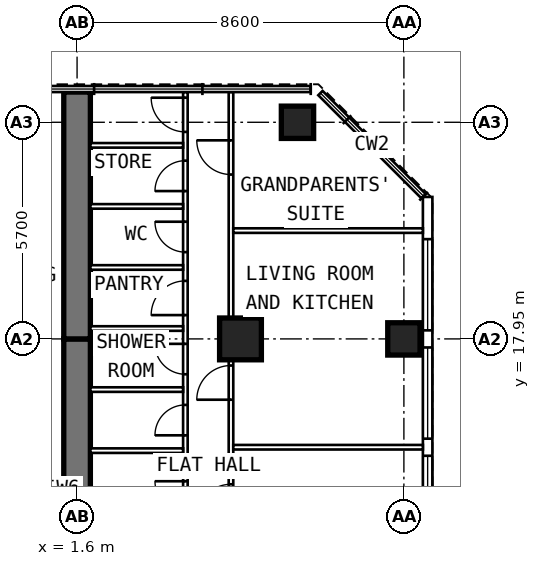
"""IFC4 building model, lengths in metres.
Left out: names, types, materials, properties, quantities, classifications, styles, units other than length and angle.
Written with IfcOpenShell. Run it as: python <this file> out.ifc"""

import sys

from ifc_helpers import new_model, si_unit, direction, frame, frame_2d, origin, origin_2d, place, context, subcontext, project, spatial, rectangle, extrude, element, fill, save


model = new_model("IFC4")
c1 = context("Model", 3, precision=1e-05, world=origin(), true_north=direction((0.0, 1.0)))
c2 = subcontext(c1, "Body", "Model", "MODEL_VIEW")
j1 = project(units=[si_unit("LENGTHUNIT", "METRE"), si_unit("PLANEANGLEUNIT", "RADIAN")], contexts=[c1])
p1 = place(None, origin())
s1 = spatial("IfcSite", under=j1, at=p1, CompositionType="ELEMENT")
p2 = place(p1, origin())
s2 = spatial("IfcBuilding", under=s1, at=p2, CompositionType="ELEMENT")
p3 = place(p2, frame((0.0, 0.0, 235.2)))
s3 = spatial("IfcBuildingStorey", under=s2, at=p3, CompositionType="ELEMENT", Elevation=235.2)
for number, where, z_axis, x_axis in (
    (1, (10.2, 17.95, 0.0), (0.0, 0.0, 1.0), (0.0, 1.0, 0.0)),
    (2, (7.4, 23.65, 0.0), (0.0, 0.0, 1.0), (0.0, 1.0, 0.0)),
):
    element("IfcColumn", number, at=place(p3, frame(where, z_axis=z_axis, x_axis=x_axis)), inside=s3, PredefinedType="COLUMN", context=c2, shape_type="SweptSolid", body=[
        extrude(rectangle(XDim=0.85, YDim=0.85, at=origin_2d()), origin(), (0.0, 0.0, 1.0), 3.6),
    ])
p4 = place(p3, frame((5.9, 17.95, 0.0), z_axis=(0.0, 0.0, 1.0), x_axis=(0.0, 1.0, 0.0)))
e3 = element("IfcColumn", 3, at=p4, inside=s3, PredefinedType="COLUMN", context=c2, shape_type="SweptSolid", body=[
    extrude(rectangle(XDim=1.1, YDim=1.1, at=origin_2d()), origin(), (0.0, 0.0, 1.0), 3.6),
])
p5 = place(p3, frame((1.6, 9.6, 0.0), z_axis=(0.0, 0.0, 1.0), x_axis=(0.0, 1.0, 0.0)))
e4 = element("IfcWall", 4, at=p5, inside=s3, PredefinedType="SHEAR", context=c2, shape_type="SweptSolid", body=[
    extrude(rectangle(XDim=8.35, YDim=0.7, at=frame_2d((4.175, 0.0))), origin(), (0.0, 0.0, 1.0), 3.6),
])
p6 = place(p5, frame((1.3, 0.0, 0.0)))
e5 = element("IfcOpeningElement", 5, at=p6, cuts=e4, PredefinedType="OPENING", context=c2, shape_type="SweptSolid", body=[
    extrude(rectangle(XDim=1.0, YDim=2.1, at=frame_2d((0.5, 1.05))), frame((0.0, 0.362, 0.0), z_axis=(0.0, -1.0, 0.0), x_axis=(1.0, 0.0, 0.0)), (0.0, 0.0, 1.0), 0.724),
])
p7 = place(p3, frame((1.6, 17.95, 0.0), z_axis=(0.0, 0.0, 1.0), x_axis=(0.0, 1.0, 0.0)))
e6 = element("IfcWall", 6, at=p7, inside=s3, PredefinedType="SHEAR", context=c2, shape_type="SweptSolid", body=[
    extrude(rectangle(XDim=6.495, YDim=0.7, at=frame_2d((3.248, 0.0))), origin(), (0.0, 0.0, 1.0), 3.6),
])
p8 = place(p3, frame((10.825, 6.409, 0.0), z_axis=(0.0, 0.0, 1.0), x_axis=(0.0, 1.0, 0.0)))
e7 = element("IfcWall", 7, at=p8, inside=s3, PredefinedType="SOLIDWALL", context=c2, shape_type="SweptSolid", body=[
    extrude(rectangle(XDim=15.276, YDim=0.25, at=frame_2d((7.638, 0.0))), origin(), (0.0, 0.0, 1.0), 3.35),
])
p9 = place(p8, frame((0.366, 0.0, 0.8)))
e8 = element("IfcOpeningElement", 8, at=p9, cuts=e7, PredefinedType="OPENING", context=c2, shape_type="SweptSolid", body=[
    extrude(rectangle(XDim=2.4, YDim=1.8, at=frame_2d((1.2, 0.9))), frame((0.0, 0.137, 0.0), z_axis=(0.0, -1.0, 0.0), x_axis=(1.0, 0.0, 0.0)), (0.0, 0.0, 1.0), 0.274),
])
p10 = place(p8, frame((3.216, 0.0, 0.8)))
e9 = element("IfcOpeningElement", 9, at=p10, cuts=e7, PredefinedType="OPENING", context=c2, shape_type="SweptSolid", body=[
    extrude(rectangle(XDim=2.4, YDim=1.8, at=frame_2d((1.2, 0.9))), frame((0.0, 0.137, 0.0), z_axis=(0.0, -1.0, 0.0), x_axis=(1.0, 0.0, 0.0)), (0.0, 0.0, 1.0), 0.274),
])
p11 = place(p8, frame((6.066, 0.0, 0.8)))
e10 = element("IfcOpeningElement", 10, at=p11, cuts=e7, PredefinedType="OPENING", context=c2, shape_type="SweptSolid", body=[
    extrude(rectangle(XDim=2.4, YDim=1.8, at=frame_2d((1.2, 0.9))), frame((0.0, 0.137, 0.0), z_axis=(0.0, -1.0, 0.0), x_axis=(1.0, 0.0, 0.0)), (0.0, 0.0, 1.0), 0.274),
])
p12 = place(p8, frame((8.916, 0.0, 0.8)))
e11 = element("IfcOpeningElement", 11, at=p12, cuts=e7, PredefinedType="OPENING", context=c2, shape_type="SweptSolid", body=[
    extrude(rectangle(XDim=2.4, YDim=1.8, at=frame_2d((1.2, 0.9))), frame((0.0, 0.137, 0.0), z_axis=(0.0, -1.0, 0.0), x_axis=(1.0, 0.0, 0.0)), (0.0, 0.0, 1.0), 0.274),
])
p13 = place(p8, frame((11.766, 0.0, 0.8)))
e12 = element("IfcOpeningElement", 12, at=p13, cuts=e7, PredefinedType="OPENING", context=c2, shape_type="SweptSolid", body=[
    extrude(rectangle(XDim=2.4, YDim=1.8, at=frame_2d((1.2, 0.9))), frame((0.0, 0.137, 0.0), z_axis=(0.0, -1.0, 0.0), x_axis=(1.0, 0.0, 0.0)), (0.0, 0.0, 1.0), 0.274),
])
p14 = place(p3, frame((4.45, 9.9, 0.0), z_axis=(0.0, 0.0, 1.0), x_axis=(0.0, 1.0, 0.0)))
e13 = element("IfcWall", 13, at=p14, inside=s3, PredefinedType="PARTITIONING", context=c2, shape_type="SweptSolid", body=[
    extrude(rectangle(XDim=14.545, YDim=0.12, at=frame_2d((7.272, 0.0))), origin(), (0.0, 0.0, 1.0), 3.35),
])
p15 = place(p14, frame((0.95, 0.0, 0.0)))
e14 = element("IfcOpeningElement", 14, at=p15, cuts=e13, PredefinedType="OPENING", context=c2, shape_type="SweptSolid", body=[
    extrude(rectangle(XDim=0.9, YDim=2.1, at=frame_2d((0.45, 1.05))), frame((0.0, 0.072, 0.0), z_axis=(0.0, -1.0, 0.0), x_axis=(1.0, 0.0, 0.0)), (0.0, 0.0, 1.0), 0.144),
])
p16 = place(p14, frame((3.505, 0.0, 0.0)))
e15 = element("IfcOpeningElement", 15, at=p16, cuts=e13, PredefinedType="OPENING", context=c2, shape_type="SweptSolid", body=[
    extrude(rectangle(XDim=0.8, YDim=2.1, at=frame_2d((0.4, 1.05))), frame((0.0, 0.072, 0.0), z_axis=(0.0, -1.0, 0.0), x_axis=(1.0, 0.0, 0.0)), (0.0, 0.0, 1.0), 0.144),
])
p17 = place(p14, frame((5.513, 0.0, 0.0)))
e16 = element("IfcOpeningElement", 16, at=p17, cuts=e13, PredefinedType="OPENING", context=c2, shape_type="SweptSolid", body=[
    extrude(rectangle(XDim=0.8, YDim=2.1, at=frame_2d((0.4, 1.05))), frame((0.0, 0.072, 0.0), z_axis=(0.0, -1.0, 0.0), x_axis=(1.0, 0.0, 0.0)), (0.0, 0.0, 1.0), 0.144),
])
p18 = place(p14, frame((7.12, 0.0, 0.0)))
e17 = element("IfcOpeningElement", 17, at=p18, cuts=e13, PredefinedType="OPENING", context=c2, shape_type="SweptSolid", body=[
    extrude(rectangle(XDim=0.8, YDim=2.1, at=frame_2d((0.4, 1.05))), frame((0.0, 0.072, 0.0), z_axis=(0.0, -1.0, 0.0), x_axis=(1.0, 0.0, 0.0)), (0.0, 0.0, 1.0), 0.144),
])
p19 = place(p14, frame((8.677, 0.0, 0.0)))
e18 = element("IfcOpeningElement", 18, at=p19, cuts=e13, PredefinedType="OPENING", context=c2, shape_type="SweptSolid", body=[
    extrude(rectangle(XDim=0.9, YDim=2.1, at=frame_2d((0.45, 1.05))), frame((0.0, 0.072, 0.0), z_axis=(0.0, -1.0, 0.0), x_axis=(1.0, 0.0, 0.0)), (0.0, 0.0, 1.0), 0.144),
])
p20 = place(p14, frame((10.333, 0.0, 0.0)))
e19 = element("IfcOpeningElement", 19, at=p20, cuts=e13, PredefinedType="OPENING", context=c2, shape_type="SweptSolid", body=[
    extrude(rectangle(XDim=0.8, YDim=2.1, at=frame_2d((0.4, 1.05))), frame((0.0, 0.072, 0.0), z_axis=(0.0, -1.0, 0.0), x_axis=(1.0, 0.0, 0.0)), (0.0, 0.0, 1.0), 0.144),
])
p21 = place(p14, frame((11.94, 0.0, 0.0)))
e20 = element("IfcOpeningElement", 20, at=p21, cuts=e13, PredefinedType="OPENING", context=c2, shape_type="SweptSolid", body=[
    extrude(rectangle(XDim=0.8, YDim=2.1, at=frame_2d((0.4, 1.05))), frame((0.0, 0.072, 0.0), z_axis=(0.0, -1.0, 0.0), x_axis=(1.0, 0.0, 0.0)), (0.0, 0.0, 1.0), 0.144),
])
p22 = place(p14, frame((13.497, 0.0, 0.0)))
e21 = element("IfcOpeningElement", 21, at=p22, cuts=e13, PredefinedType="OPENING", context=c2, shape_type="SweptSolid", body=[
    extrude(rectangle(XDim=0.9, YDim=2.1, at=frame_2d((0.45, 1.05))), frame((0.0, 0.072, 0.0), z_axis=(0.0, -1.0, 0.0), x_axis=(1.0, 0.0, 0.0)), (0.0, 0.0, 1.0), 0.144),
])
p23 = place(p3, frame((5.65, 9.6, 0.0), z_axis=(0.0, 0.0, 1.0), x_axis=(0.0, 1.0, 0.0)))
e22 = element("IfcWall", 22, at=p23, inside=s3, PredefinedType="PARTITIONING", context=c2, shape_type="SweptSolid", body=[
    extrude(rectangle(XDim=14.845, YDim=0.12, at=frame_2d((7.422, 0.0))), origin(), (0.0, 0.0, 1.0), 3.35),
])
p24 = place(p23, frame((1.05, 0.0, 0.0)))
e23 = element("IfcOpeningElement", 23, at=p24, cuts=e22, PredefinedType="OPENING", context=c2, shape_type="SweptSolid", body=[
    extrude(rectangle(XDim=0.9, YDim=2.1, at=frame_2d((0.45, 1.05))), frame((0.0, 0.072, 0.0), z_axis=(0.0, -1.0, 0.0), x_axis=(1.0, 0.0, 0.0)), (0.0, 0.0, 1.0), 0.144),
])
p25 = place(p23, frame((3.625, 0.0, 0.0)))
e24 = element("IfcOpeningElement", 24, at=p25, cuts=e22, PredefinedType="OPENING", context=c2, shape_type="SweptSolid", body=[
    extrude(rectangle(XDim=0.9, YDim=2.1, at=frame_2d((0.45, 1.05))), frame((0.0, 0.072, 0.0), z_axis=(0.0, -1.0, 0.0), x_axis=(1.0, 0.0, 0.0)), (0.0, 0.0, 1.0), 0.144),
])
p26 = place(p23, frame((6.75, 0.0, 0.0)))
e25 = element("IfcOpeningElement", 25, at=p26, cuts=e22, PredefinedType="OPENING", context=c2, shape_type="SweptSolid", body=[
    extrude(rectangle(XDim=0.9, YDim=2.1, at=frame_2d((0.45, 1.05))), frame((0.0, 0.072, 0.0), z_axis=(0.0, -1.0, 0.0), x_axis=(1.0, 0.0, 0.0)), (0.0, 0.0, 1.0), 0.144),
])
p27 = place(p23, frame((12.675, 0.0, 0.0)))
e26 = element("IfcOpeningElement", 26, at=p27, cuts=e22, PredefinedType="OPENING", context=c2, shape_type="SweptSolid", body=[
    extrude(rectangle(XDim=0.9, YDim=2.1, at=frame_2d((0.45, 1.05))), frame((0.0, 0.072, 0.0), z_axis=(0.0, -1.0, 0.0), x_axis=(1.0, 0.0, 0.0)), (0.0, 0.0, 1.0), 0.144),
])
for number, where, z_axis, x_axis in (
    (27, (5.71, 15.1, 0.0), (0.0, 0.0, 1.0), (1.0, 0.0, 0.0)),
    (28, (5.71, 20.8, 0.0), (0.0, 0.0, 1.0), (1.0, 0.0, 0.0)),
):
    element("IfcWall", number, at=place(p3, frame(where, z_axis=z_axis, x_axis=x_axis)), inside=s3, PredefinedType="PARTITIONING", context=c2, shape_type="SweptSolid", body=[
        extrude(rectangle(XDim=4.99, YDim=0.12, at=frame_2d((2.495, 0.0))), origin(), (0.0, 0.0, 1.0), 3.35),
    ])
for number, where, z_axis, x_axis in (
    (29, (1.95, 15.01, 0.0), (0.0, 0.0, 1.0), (1.0, 0.0, 0.0)),
    (30, (1.95, 16.617, 0.0), (0.0, 0.0, 1.0), (1.0, 0.0, 0.0)),
):
    element("IfcWall", number, at=place(p3, frame(where, z_axis=z_axis, x_axis=x_axis)), inside=s3, PredefinedType="PARTITIONING", context=c2, shape_type="SweptSolid", body=[
        extrude(rectangle(XDim=2.44, YDim=0.12, at=frame_2d((1.22, 0.0))), origin(), (0.0, 0.0, 1.0), 3.35),
    ])
p28 = place(p3, frame((1.95, 18.223, 0.0), z_axis=(0.0, 0.0, 1.0), x_axis=(1.0, 0.0, 0.0)))
e31 = element("IfcWall", 31, at=p28, inside=s3, PredefinedType="PARTITIONING", context=c2, shape_type="SweptSolid", body=[
    extrude(rectangle(XDim=2.44, YDim=0.12, at=frame_2d((1.22, 0.0))), origin(), (0.0, 0.0, 1.0), 2.45),
])
for number, where, z_axis, x_axis in (
    (32, (1.95, 19.83, 0.0), (0.0, 0.0, 1.0), (1.0, 0.0, 0.0)),
    (33, (1.95, 21.437, 0.0), (0.0, 0.0, 1.0), (1.0, 0.0, 0.0)),
    (34, (1.95, 23.043, 0.0), (0.0, 0.0, 1.0), (1.0, 0.0, 0.0)),
):
    element("IfcWall", number, at=place(p3, frame(where, z_axis=z_axis, x_axis=x_axis)), inside=s3, PredefinedType="PARTITIONING", context=c2, shape_type="SweptSolid", body=[
        extrude(rectangle(XDim=2.44, YDim=0.12, at=frame_2d((1.22, 0.0))), origin(), (0.0, 0.0, 1.0), 3.35),
    ])
p29 = place(p3, frame((1.25, 14.0, 0.0), z_axis=(0.0, 0.0, 1.0), x_axis=(-1.0, 0.0, 0.0)))
e35 = element("IfcWall", 35, at=p29, inside=s3, PredefinedType="PARTITIONING", context=c2, shape_type="SweptSolid", body=[
    extrude(rectangle(XDim=2.5, YDim=0.15, at=frame_2d((1.25, 0.0))), origin(), (0.0, 0.0, 1.0), 3.35),
])
p30 = place(p29, frame((0.75, 0.0, 0.0)))
e36 = element("IfcOpeningElement", 36, at=p30, cuts=e35, PredefinedType="OPENING", context=c2, shape_type="SweptSolid", body=[
    extrude(rectangle(XDim=1.0, YDim=2.1, at=frame_2d((0.5, 1.05))), frame((0.0, 0.087, 0.0), z_axis=(0.0, -1.0, 0.0), x_axis=(1.0, 0.0, 0.0)), (0.0, 0.0, 1.0), 0.174),
])
p31 = place(p11, origin())
e37 = element("IfcWindow", 37, at=p31, inside=s3, PartitioningType="SINGLE_PANEL", PredefinedType="WINDOW", context=c2, shape_type="SweptSolid", body=[
    extrude(rectangle(XDim=2.4, YDim=1.8, at=frame_2d((1.2, 0.9))), frame((0.0, 0.03, 0.0), z_axis=(0.0, -1.0, 0.0), x_axis=(1.0, 0.0, 0.0)), (0.0, 0.0, 1.0), 0.06),
])
fill(e10, e37)
p32 = place(p12, origin())
e38 = element("IfcWindow", 38, at=p32, inside=s3, PartitioningType="SINGLE_PANEL", PredefinedType="WINDOW", context=c2, shape_type="SweptSolid", body=[
    extrude(rectangle(XDim=2.4, YDim=1.8, at=frame_2d((1.2, 0.9))), frame((0.0, 0.03, 0.0), z_axis=(0.0, -1.0, 0.0), x_axis=(1.0, 0.0, 0.0)), (0.0, 0.0, 1.0), 0.06),
])
fill(e11, e38)
p33 = place(p13, origin())
e39 = element("IfcWindow", 39, at=p33, inside=s3, PartitioningType="SINGLE_PANEL", PredefinedType="WINDOW", context=c2, shape_type="SweptSolid", body=[
    extrude(rectangle(XDim=2.4, YDim=1.8, at=frame_2d((1.2, 0.9))), frame((0.0, 0.03, 0.0), z_axis=(0.0, -1.0, 0.0), x_axis=(1.0, 0.0, 0.0)), (0.0, 0.0, 1.0), 0.06),
])
fill(e12, e39)
p34 = place(p25, origin())
e40 = element("IfcDoor", 40, at=p34, inside=s3, OperationType="SINGLE_SWING_LEFT", PredefinedType="DOOR", context=c2, shape_type="SweptSolid", body=[
    extrude(rectangle(XDim=0.9, YDim=2.1, at=frame_2d((0.45, 1.05))), frame((0.0, 0.025, 0.0), z_axis=(0.0, -1.0, 0.0), x_axis=(1.0, 0.0, 0.0)), (0.0, 0.0, 1.0), 0.05),
])
fill(e24, e40)
p35 = place(p26, origin())
e41 = element("IfcDoor", 41, at=p35, inside=s3, OperationType="SINGLE_SWING_LEFT", PredefinedType="DOOR", context=c2, shape_type="SweptSolid", body=[
    extrude(rectangle(XDim=0.9, YDim=2.1, at=frame_2d((0.45, 1.05))), frame((0.0, 0.025, 0.0), z_axis=(0.0, -1.0, 0.0), x_axis=(1.0, 0.0, 0.0)), (0.0, 0.0, 1.0), 0.05),
])
fill(e25, e41)
p36 = place(p27, origin())
e42 = element("IfcDoor", 42, at=p36, inside=s3, OperationType="SINGLE_SWING_RIGHT", PredefinedType="DOOR", context=c2, shape_type="SweptSolid", body=[
    extrude(rectangle(XDim=0.9, YDim=2.1, at=frame_2d((0.45, 1.05))), frame((0.0, 0.025, 0.0), z_axis=(0.0, -1.0, 0.0), x_axis=(1.0, 0.0, 0.0)), (0.0, 0.0, 1.0), 0.05),
])
fill(e26, e42)
p37 = place(p16, origin())
e43 = element("IfcDoor", 43, at=p37, inside=s3, OperationType="SINGLE_SWING_RIGHT", PredefinedType="DOOR", context=c2, shape_type="SweptSolid", body=[
    extrude(rectangle(XDim=0.8, YDim=2.1, at=frame_2d((0.4, 1.05))), frame((0.0, 0.025, 0.0), z_axis=(0.0, -1.0, 0.0), x_axis=(1.0, 0.0, 0.0)), (0.0, 0.0, 1.0), 0.05),
])
fill(e15, e43)
p38 = place(p17, origin())
e44 = element("IfcDoor", 44, at=p38, inside=s3, OperationType="SINGLE_SWING_LEFT", PredefinedType="DOOR", context=c2, shape_type="SweptSolid", body=[
    extrude(rectangle(XDim=0.8, YDim=2.1, at=frame_2d((0.4, 1.05))), frame((0.0, 0.025, 0.0), z_axis=(0.0, -1.0, 0.0), x_axis=(1.0, 0.0, 0.0)), (0.0, 0.0, 1.0), 0.05),
])
fill(e16, e44)
p39 = place(p18, origin())
e45 = element("IfcDoor", 45, at=p39, inside=s3, OperationType="SINGLE_SWING_RIGHT", PredefinedType="DOOR", context=c2, shape_type="SweptSolid", body=[
    extrude(rectangle(XDim=0.8, YDim=2.1, at=frame_2d((0.4, 1.05))), frame((0.0, 0.025, 0.0), z_axis=(0.0, -1.0, 0.0), x_axis=(1.0, 0.0, 0.0)), (0.0, 0.0, 1.0), 0.05),
])
fill(e17, e45)
p40 = place(p19, origin())
e46 = element("IfcDoor", 46, at=p40, inside=s3, OperationType="SINGLE_SWING_LEFT", PredefinedType="DOOR", context=c2, shape_type="SweptSolid", body=[
    extrude(rectangle(XDim=0.9, YDim=2.1, at=frame_2d((0.45, 1.05))), frame((0.0, 0.025, 0.0), z_axis=(0.0, -1.0, 0.0), x_axis=(1.0, 0.0, 0.0)), (0.0, 0.0, 1.0), 0.05),
])
fill(e18, e46)
p41 = place(p20, origin())
e47 = element("IfcDoor", 47, at=p41, inside=s3, OperationType="SINGLE_SWING_RIGHT", PredefinedType="DOOR", context=c2, shape_type="SweptSolid", body=[
    extrude(rectangle(XDim=0.8, YDim=2.1, at=frame_2d((0.4, 1.05))), frame((0.0, 0.025, 0.0), z_axis=(0.0, -1.0, 0.0), x_axis=(1.0, 0.0, 0.0)), (0.0, 0.0, 1.0), 0.05),
])
fill(e19, e47)
p42 = place(p21, origin())
e48 = element("IfcDoor", 48, at=p42, inside=s3, OperationType="SINGLE_SWING_LEFT", PredefinedType="DOOR", context=c2, shape_type="SweptSolid", body=[
    extrude(rectangle(XDim=0.8, YDim=2.1, at=frame_2d((0.4, 1.05))), frame((0.0, 0.025, 0.0), z_axis=(0.0, -1.0, 0.0), x_axis=(1.0, 0.0, 0.0)), (0.0, 0.0, 1.0), 0.05),
])
fill(e20, e48)
p43 = place(p22, origin())
e49 = element("IfcDoor", 49, at=p43, inside=s3, OperationType="SINGLE_SWING_RIGHT", PredefinedType="DOOR", context=c2, shape_type="SweptSolid", body=[
    extrude(rectangle(XDim=0.9, YDim=2.1, at=frame_2d((0.45, 1.05))), frame((0.0, 0.025, 0.0), z_axis=(0.0, -1.0, 0.0), x_axis=(1.0, 0.0, 0.0)), (0.0, 0.0, 1.0), 0.05),
])
fill(e21, e49)
save(model, sys.argv[1])
